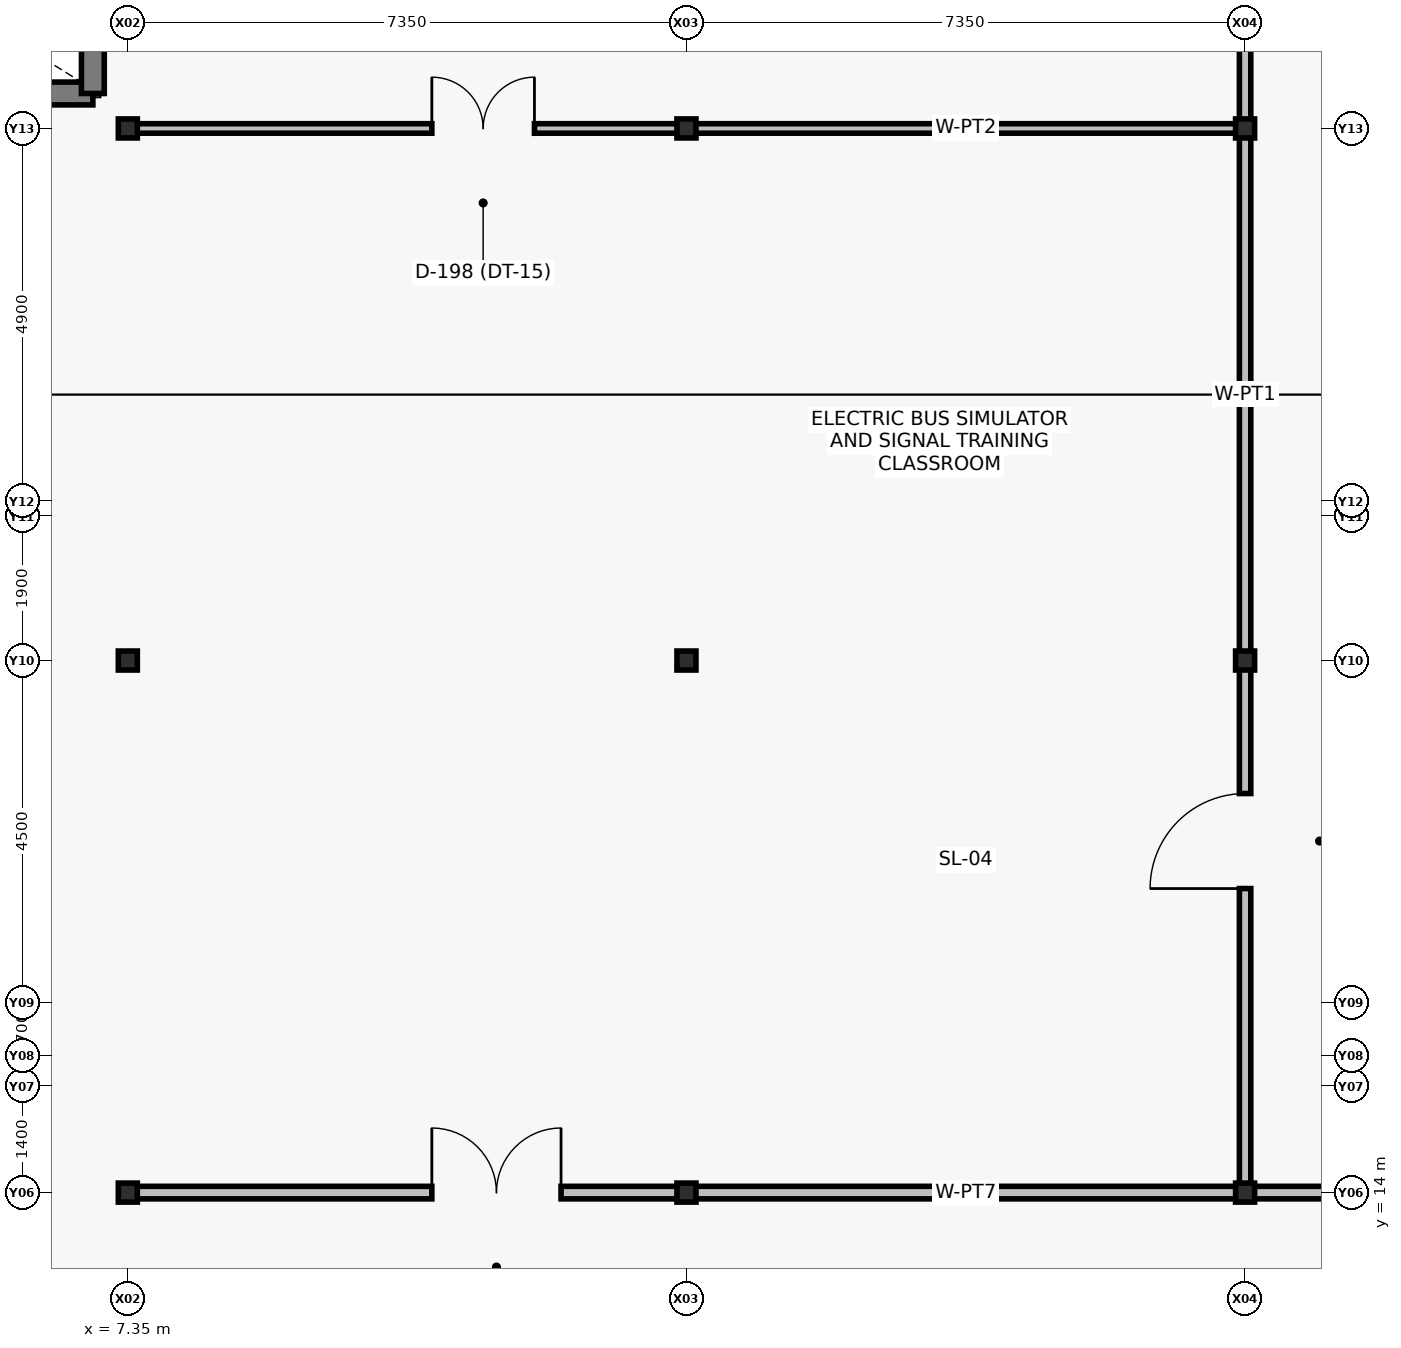
"""IFC4 building model, lengths in metres.
Left out: names, types, materials, properties, quantities, classifications, styles, units other than length and angle.
Written with IfcOpenShell. Run it as: python <this file> out.ifc"""

import sys

from ifc_helpers import new_model, si_unit, direction, frame, frame_2d, origin, origin_2d, place, context, subcontext, project, spatial, rectangle, i_section, extrude, element, fill, save


model = new_model("IFC4")
c1 = context("Model", 3, precision=1e-05, world=origin(), true_north=direction((0.0, 1.0)))
c2 = subcontext(c1, "Body", "Model", "MODEL_VIEW")
j1 = project(units=[si_unit("LENGTHUNIT", "METRE"), si_unit("PLANEANGLEUNIT", "RADIAN")], contexts=[c1])
p1 = place(None, origin())
s1 = spatial("IfcSite", under=j1, at=p1, CompositionType="ELEMENT")
p2 = place(p1, origin())
s2 = spatial("IfcBuilding", under=s1, at=p2, CompositionType="ELEMENT")
p3 = place(p2, frame((0.0, 0.0, 15.3)))
s3 = spatial("IfcBuildingStorey", under=s2, at=p3, CompositionType="ELEMENT", Elevation=15.3)
for number, where, z_axis, x_axis in (
    (1, (7.35, 14.0, 0.0), (0.0, 0.0, 1.0), (1.0, 0.0, 0.0)),
    (2, (7.35, 21.0, 0.0), (0.0, 0.0, 1.0), (1.0, 0.0, 0.0)),
    (3, (7.35, 28.0, 0.0), (0.0, 0.0, 1.0), (1.0, 0.0, 0.0)),
    (4, (14.7, 14.0, 0.0), (0.0, 0.0, 1.0), (1.0, 0.0, 0.0)),
    (5, (14.7, 21.0, 0.0), (0.0, 0.0, 1.0), (1.0, 0.0, 0.0)),
    (6, (14.7, 28.0, 0.0), (0.0, 0.0, 1.0), (1.0, 0.0, 0.0)),
    (7, (22.05, 14.0, 0.0), (0.0, 0.0, 1.0), (1.0, 0.0, 0.0)),
    (8, (22.05, 21.0, 0.0), (0.0, 0.0, 1.0), (1.0, 0.0, 0.0)),
    (9, (22.05, 28.0, 0.0), (0.0, 0.0, 1.0), (1.0, 0.0, 0.0)),
):
    element("IfcColumn", number, at=place(p3, frame(where, z_axis=z_axis, x_axis=x_axis)), inside=s3, PredefinedType="COLUMN", context=c2, shape_type="SweptSolid", body=[
        extrude(i_section(OverallWidth=0.25, OverallDepth=0.25, WebThickness=0.009, FlangeThickness=0.014, at=origin_2d()), origin(), (0.0, 0.0, 1.0), 4.2),
    ])
p4 = place(p3, frame((0.46, 28.46, 0.0), z_axis=(0.0, 0.0, 1.0), x_axis=(1.0, 0.0, 0.0)))
e10 = element("IfcWall", 10, at=p4, inside=s3, PredefinedType="SHEAR", context=c2, shape_type="SweptSolid", body=[
    extrude(rectangle(XDim=6.43, YDim=0.3, at=frame_2d((3.215, 0.0))), origin(), (0.0, 0.0, 1.0), 3.92),
])
p5 = place(p3, frame((6.89, 28.46, 0.0), z_axis=(0.0, 0.0, 1.0), x_axis=(0.0, 1.0, 0.0)))
e11 = element("IfcWall", 11, at=p5, inside=s3, PredefinedType="SHEAR", context=c2, shape_type="SweptSolid", body=[
    extrude(rectangle(XDim=6.08, YDim=0.3, at=frame_2d((3.04, 0.0))), origin(), (0.0, 0.0, 1.0), 3.92),
])
p6 = place(p3, frame((7.35, 14.0, 0.0), z_axis=(0.0, 0.0, 1.0), x_axis=(1.0, 0.0, 0.0)))
e12 = element("IfcWall", 12, at=p6, inside=s3, PredefinedType="PARTITIONING", context=c2, shape_type="SweptSolid", body=[
    extrude(rectangle(XDim=22.05, YDim=0.165, at=frame_2d((11.025, 0.0))), origin(), (0.0, 0.0, 1.0), 3.2),
])
p7 = place(p6, frame((4.0, 0.0, 0.0)))
e13 = element("IfcOpeningElement", 13, at=p7, cuts=e12, PredefinedType="OPENING", context=c2, shape_type="SweptSolid", body=[
    extrude(rectangle(XDim=1.7, YDim=2.25, at=frame_2d((0.85, 1.125))), frame((0.0, 0.092, 0.0), z_axis=(0.0, -1.0, 0.0), x_axis=(1.0, 0.0, 0.0)), (0.0, 0.0, 1.0), 0.185),
])
p8 = place(p3, frame((22.05, 14.0, 0.0), z_axis=(0.0, 0.0, 1.0), x_axis=(0.0, 1.0, 0.0)))
e14 = element("IfcWall", 14, at=p8, inside=s3, PredefinedType="PARTITIONING", context=c2, shape_type="SweptSolid", body=[
    extrude(rectangle(XDim=21.0, YDim=0.15, at=frame_2d((10.5, 0.0))), origin(), (0.0, 0.0, 1.0), 3.2),
])
p9 = place(p8, frame((4.0, 0.0, 0.0)))
e15 = element("IfcOpeningElement", 15, at=p9, cuts=e14, PredefinedType="OPENING", context=c2, shape_type="SweptSolid", body=[
    extrude(rectangle(XDim=1.25, YDim=2.15, at=frame_2d((0.625, 1.075))), frame((0.0, 0.085, 0.0), z_axis=(0.0, -1.0, 0.0), x_axis=(1.0, 0.0, 0.0)), (0.0, 0.0, 1.0), 0.17),
])
p10 = place(p8, frame((17.5, 0.0, 0.0)))
e16 = element("IfcOpeningElement", 16, at=p10, cuts=e14, PredefinedType="OPENING", context=c2, shape_type="SweptSolid", body=[
    extrude(rectangle(XDim=1.15, YDim=2.15, at=frame_2d((0.575, 1.075))), frame((0.0, 0.085, 0.0), z_axis=(0.0, -1.0, 0.0), x_axis=(1.0, 0.0, 0.0)), (0.0, 0.0, 1.0), 0.17),
])
p11 = place(p3, frame((7.35, 28.0, 0.0), z_axis=(0.0, 0.0, 1.0), x_axis=(1.0, 0.0, 0.0)))
e17 = element("IfcWall", 17, at=p11, inside=s3, PredefinedType="PARTITIONING", context=c2, shape_type="SweptSolid", body=[
    extrude(rectangle(XDim=14.7, YDim=0.125, at=frame_2d((7.35, 0.0))), origin(), (0.0, 0.0, 1.0), 3.2),
])
p12 = place(p11, frame((4.0, 0.0, 0.0)))
e18 = element("IfcOpeningElement", 18, at=p12, cuts=e17, PredefinedType="OPENING", context=c2, shape_type="SweptSolid", body=[
    extrude(rectangle(XDim=1.35, YDim=2.2, at=frame_2d((0.675, 1.1))), frame((0.0, 0.072, 0.0), z_axis=(0.0, -1.0, 0.0), x_axis=(1.0, 0.0, 0.0)), (0.0, 0.0, 1.0), 0.145),
])
p13 = place(p7, origin())
e19 = element("IfcDoor", 19, at=p13, inside=s3, OperationType="DOUBLE_DOOR_SINGLE_SWING", PredefinedType="DOOR", context=c2, shape_type="SweptSolid", body=[
    extrude(rectangle(XDim=1.7, YDim=2.25, at=frame_2d((0.85, 1.125))), frame((0.0, 0.025, 0.0), z_axis=(0.0, -1.0, 0.0), x_axis=(1.0, 0.0, 0.0)), (0.0, 0.0, 1.0), 0.05),
])
fill(e13, e19)
p14 = place(p9, origin())
e20 = element("IfcDoor", 20, at=p14, inside=s3, OperationType="SINGLE_SWING_LEFT", PredefinedType="DOOR", context=c2, shape_type="SweptSolid", body=[
    extrude(rectangle(XDim=1.25, YDim=2.15, at=frame_2d((0.625, 1.075))), frame((0.0, 0.025, 0.0), z_axis=(0.0, -1.0, 0.0), x_axis=(1.0, 0.0, 0.0)), (0.0, 0.0, 1.0), 0.05),
])
fill(e15, e20)
p15 = place(p12, origin())
e21 = element("IfcDoor", 21, at=p15, inside=s3, OperationType="DOUBLE_DOOR_SINGLE_SWING", PredefinedType="DOOR", context=c2, shape_type="SweptSolid", body=[
    extrude(rectangle(XDim=1.35, YDim=2.2, at=frame_2d((0.675, 1.1))), frame((0.0, 0.025, 0.0), z_axis=(0.0, -1.0, 0.0), x_axis=(1.0, 0.0, 0.0)), (0.0, 0.0, 1.0), 0.05),
])
fill(e18, e21)
save(model, sys.argv[1])
